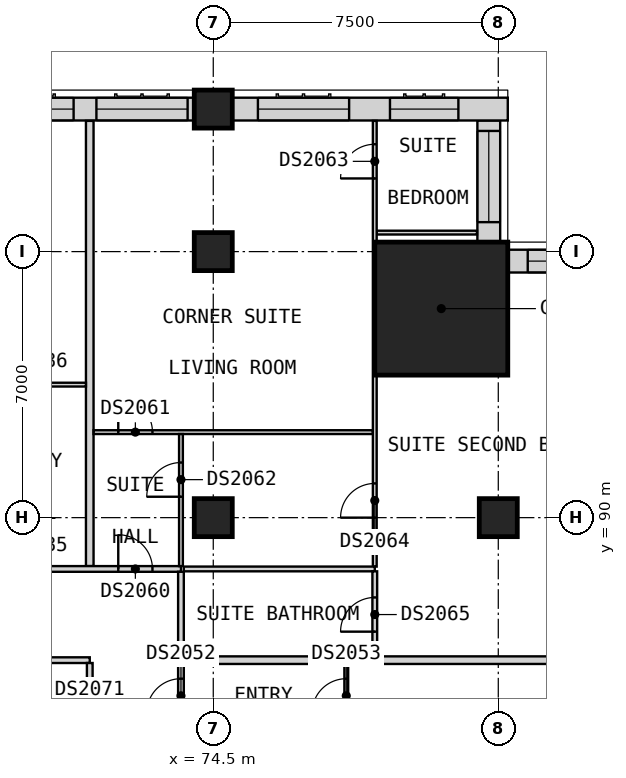
"""IFC4 building model, lengths in metres.
Left out: names, types, materials, properties, quantities, classifications, styles, units other than length and angle.
Written with IfcOpenShell. Run it as: python <this file> out.ifc"""

import sys

from ifc_helpers import new_model, si_unit, direction, frame, frame_2d, origin, origin_2d, place, context, subcontext, project, spatial, rectangle, extrude, element, fill, save


model = new_model("IFC4")
c1 = context("Model", 3, precision=1e-05, world=origin(), true_north=direction((0.0, 1.0)))
c2 = subcontext(c1, "Body", "Model", "MODEL_VIEW")
j1 = project(units=[si_unit("LENGTHUNIT", "METRE"), si_unit("PLANEANGLEUNIT", "RADIAN")], contexts=[c1])
p1 = place(None, origin())
s1 = spatial("IfcSite", under=j1, at=p1, CompositionType="ELEMENT")
p2 = place(p1, origin())
s2 = spatial("IfcBuilding", under=s1, at=p2, CompositionType="ELEMENT")
p3 = place(p2, frame((0.0, 0.0, 162.6)))
s3 = spatial("IfcBuildingStorey", under=s2, at=p3, CompositionType="ELEMENT", Elevation=162.6)
for number, where, z_axis, x_axis in (
    (1, (74.5, 100.75, 0.0), (0.0, 0.0, 1.0), (1.0, 0.0, 0.0)),
    (2, (74.5, 90.0, 0.0), (0.0, 0.0, 1.0), (1.0, 0.0, 0.0)),
    (3, (74.5, 97.0, 0.0), (0.0, 0.0, 1.0), (1.0, 0.0, 0.0)),
    (4, (82.0, 90.0, 0.0), (0.0, 0.0, 1.0), (1.0, 0.0, 0.0)),
):
    element("IfcColumn", number, at=place(p3, frame(where, z_axis=z_axis, x_axis=x_axis)), inside=s3, PredefinedType="COLUMN", context=c2, shape_type="SweptSolid", body=[
        extrude(rectangle(XDim=1.0, YDim=1.0, at=origin_2d()), origin(), (0.0, 0.0, 1.0), 3.6),
    ])
p4 = place(p3, frame((80.5, 95.5, 0.0), z_axis=(0.0, 0.0, 1.0), x_axis=(1.0, 0.0, 0.0)))
e5 = element("IfcColumn", 5, at=p4, inside=s3, PredefinedType="COLUMN", context=c2, shape_type="SweptSolid", body=[
    extrude(rectangle(XDim=3.5, YDim=3.5, at=origin_2d()), origin(), (0.0, 0.0, 1.0), 3.6),
])
p5 = place(p3, frame((85.45, 96.75, 0.0), z_axis=(0.0, 0.0, 1.0), x_axis=(-1.0, 0.0, 0.0)))
e6 = element("IfcWall", 6, at=p5, inside=s3, PredefinedType="SOLIDWALL", context=c2, shape_type="SweptSolid", body=[
    extrude(rectangle(XDim=3.2, YDim=0.6, at=frame_2d((1.6, 0.0))), origin(), (0.0, 0.0, 1.0), 3.2),
])
p6 = place(p5, frame((0.275, 0.0, 0.8)))
e7 = element("IfcOpeningElement", 7, at=p6, cuts=e6, PredefinedType="OPENING", context=c2, shape_type="SweptSolid", body=[
    extrude(rectangle(XDim=2.4, YDim=1.8, at=frame_2d((1.2, 0.9))), frame((0.0, 0.31, 0.0), z_axis=(0.0, -1.0, 0.0), x_axis=(1.0, 0.0, 0.0)), (0.0, 0.0, 1.0), 0.62),
])
p7 = place(p3, frame((81.75, 97.25, 0.0), z_axis=(0.0, 0.0, 1.0), x_axis=(0.0, 1.0, 0.0)))
e8 = element("IfcWall", 8, at=p7, inside=s3, PredefinedType="SOLIDWALL", context=c2, shape_type="SweptSolid", body=[
    extrude(rectangle(XDim=3.2, YDim=0.6, at=frame_2d((1.6, 0.0))), origin(), (0.0, 0.0, 1.0), 3.2),
])
p8 = place(p7, frame((0.525, 0.0, 0.8)))
e9 = element("IfcOpeningElement", 9, at=p8, cuts=e8, PredefinedType="OPENING", context=c2, shape_type="SweptSolid", body=[
    extrude(rectangle(XDim=2.4, YDim=1.8, at=frame_2d((1.2, 0.9))), frame((0.0, 0.31, 0.0), z_axis=(0.0, -1.0, 0.0), x_axis=(1.0, 0.0, 0.0)), (0.0, 0.0, 1.0), 0.62),
])
p9 = place(p3, frame((82.25, 100.75, 0.0), z_axis=(0.0, 0.0, 1.0), x_axis=(-1.0, 0.0, 0.0)))
e10 = element("IfcWall", 10, at=p9, inside=s3, PredefinedType="SOLIDWALL", context=c2, shape_type="SweptSolid", body=[
    extrude(rectangle(XDim=7.25, YDim=0.6, at=frame_2d((3.625, 0.0))), origin(), (0.0, 0.0, 1.0), 2.85),
])
p10 = place(p9, frame((4.175, 0.0, 0.8)))
e11 = element("IfcOpeningElement", 11, at=p10, cuts=e10, PredefinedType="OPENING", context=c2, shape_type="SweptSolid", body=[
    extrude(rectangle(XDim=2.4, YDim=1.8, at=frame_2d((1.2, 0.9))), frame((0.0, 0.31, 0.0), z_axis=(0.0, -1.0, 0.0), x_axis=(1.0, 0.0, 0.0)), (0.0, 0.0, 1.0), 0.62),
])
p11 = place(p9, frame((1.3, 0.0, 0.8)))
e12 = element("IfcOpeningElement", 12, at=p11, cuts=e10, PredefinedType="OPENING", context=c2, shape_type="SweptSolid", body=[
    extrude(rectangle(XDim=1.8, YDim=1.8, at=frame_2d((0.9, 0.9))), frame((0.0, 0.31, 0.0), z_axis=(0.0, -1.0, 0.0), x_axis=(1.0, 0.0, 0.0)), (0.0, 0.0, 1.0), 0.62),
])
p12 = place(p3, frame((74.0, 100.75, 0.0), z_axis=(0.0, 0.0, 1.0), x_axis=(-1.0, 0.0, 0.0)))
e13 = element("IfcWall", 13, at=p12, inside=s3, PredefinedType="SOLIDWALL", context=c2, shape_type="SweptSolid", body=[
    extrude(rectangle(XDim=6.0, YDim=0.6, at=frame_2d((3.0, 0.0))), origin(), (0.0, 0.0, 1.0), 2.85),
])
p13 = place(p12, frame((3.175, 0.0, 0.8)))
e14 = element("IfcOpeningElement", 14, at=p13, cuts=e13, PredefinedType="OPENING", context=c2, shape_type="SweptSolid", body=[
    extrude(rectangle(XDim=2.4, YDim=1.8, at=frame_2d((1.2, 0.9))), frame((0.0, 0.31, 0.0), z_axis=(0.0, -1.0, 0.0), x_axis=(1.0, 0.0, 0.0)), (0.0, 0.0, 1.0), 0.62),
])
p14 = place(p12, frame((0.175, 0.0, 0.8)))
e15 = element("IfcOpeningElement", 15, at=p14, cuts=e13, PredefinedType="OPENING", context=c2, shape_type="SweptSolid", body=[
    extrude(rectangle(XDim=2.4, YDim=1.8, at=frame_2d((1.2, 0.9))), frame((0.0, 0.31, 0.0), z_axis=(0.0, -1.0, 0.0), x_axis=(1.0, 0.0, 0.0)), (0.0, 0.0, 1.0), 0.62),
])
for number, where, z_axis, x_axis in (
    (16, (73.725, 86.25, 0.0), (0.0, 0.0, 1.0), (1.0, 0.0, 0.0)),
    (17, (71.25, 88.725, 0.0), (0.0, 0.0, 1.0), (0.0, 1.0, 0.0)),
):
    element("IfcWall", number, at=place(p3, frame(where, z_axis=z_axis, x_axis=x_axis)), inside=s3, PredefinedType="PARTITIONING", context=c2, shape_type="SweptSolid", body=[
        extrude(rectangle(XDim=11.715, YDim=0.2, at=frame_2d((5.857, 0.0))), origin(), (0.0, 0.0, 1.0), 3.2),
    ])
p15 = place(p3, frame((33.75, 86.25, 0.0), z_axis=(0.0, 0.0, 1.0), x_axis=(1.0, 0.0, 0.0)))
e18 = element("IfcWall", 18, at=p15, inside=s3, PredefinedType="PARTITIONING", context=c2, shape_type="SweptSolid", body=[
    extrude(rectangle(XDim=37.5, YDim=0.15, at=frame_2d((18.75, 0.0))), origin(), (0.0, 0.0, 1.0), 3.2),
])
p16 = place(p15, frame((1.8, 0.0, 0.0)))
e19 = element("IfcOpeningElement", 19, at=p16, cuts=e18, PredefinedType="OPENING", context=c2, shape_type="SweptSolid", body=[
    extrude(rectangle(XDim=0.9, YDim=2.1, at=frame_2d((0.45, 1.05))), frame((0.0, 0.085, 0.0), z_axis=(0.0, -1.0, 0.0), x_axis=(1.0, 0.0, 0.0)), (0.0, 0.0, 1.0), 0.17),
])
p17 = place(p3, frame((33.75, 88.65, 0.0), z_axis=(0.0, 0.0, 1.0), x_axis=(1.0, 0.0, 0.0)))
e20 = element("IfcWall", 20, at=p17, inside=s3, PredefinedType="PARTITIONING", context=c2, shape_type="SweptSolid", body=[
    extrude(rectangle(XDim=39.9, YDim=0.15, at=frame_2d((19.95, 0.0))), origin(), (0.0, 0.0, 1.0), 3.2),
])
p18 = place(p17, frame((5.175, 0.0, 0.0)))
e21 = element("IfcOpeningElement", 21, at=p18, cuts=e20, PredefinedType="OPENING", context=c2, shape_type="SweptSolid", body=[
    extrude(rectangle(XDim=0.9, YDim=2.1, at=frame_2d((0.45, 1.05))), frame((0.0, 0.085, 0.0), z_axis=(0.0, -1.0, 0.0), x_axis=(1.0, 0.0, 0.0)), (0.0, 0.0, 1.0), 0.17),
])
p19 = place(p17, frame((9.3, 0.0, 0.0)))
e22 = element("IfcOpeningElement", 22, at=p19, cuts=e20, PredefinedType="OPENING", context=c2, shape_type="SweptSolid", body=[
    extrude(rectangle(XDim=0.9, YDim=2.1, at=frame_2d((0.45, 1.05))), frame((0.0, 0.085, 0.0), z_axis=(0.0, -1.0, 0.0), x_axis=(1.0, 0.0, 0.0)), (0.0, 0.0, 1.0), 0.17),
])
p20 = place(p17, frame((21.113, 0.0, 0.0)))
e23 = element("IfcOpeningElement", 23, at=p20, cuts=e20, PredefinedType="OPENING", context=c2, shape_type="SweptSolid", body=[
    extrude(rectangle(XDim=0.9, YDim=2.1, at=frame_2d((0.45, 1.05))), frame((0.0, 0.085, 0.0), z_axis=(0.0, -1.0, 0.0), x_axis=(1.0, 0.0, 0.0)), (0.0, 0.0, 1.0), 0.17),
])
p21 = place(p17, frame((28.05, 0.0, 0.0)))
e24 = element("IfcOpeningElement", 24, at=p21, cuts=e20, PredefinedType="OPENING", context=c2, shape_type="SweptSolid", body=[
    extrude(rectangle(XDim=0.9, YDim=2.1, at=frame_2d((0.45, 1.05))), frame((0.0, 0.085, 0.0), z_axis=(0.0, -1.0, 0.0), x_axis=(1.0, 0.0, 0.0)), (0.0, 0.0, 1.0), 0.17),
])
p22 = place(p17, frame((35.55, 0.0, 0.0)))
e25 = element("IfcOpeningElement", 25, at=p22, cuts=e20, PredefinedType="OPENING", context=c2, shape_type="SweptSolid", body=[
    extrude(rectangle(XDim=0.9, YDim=2.1, at=frame_2d((0.45, 1.05))), frame((0.0, 0.085, 0.0), z_axis=(0.0, -1.0, 0.0), x_axis=(1.0, 0.0, 0.0)), (0.0, 0.0, 1.0), 0.17),
])
p23 = place(p17, frame((38.25, 0.0, 0.0)))
e26 = element("IfcOpeningElement", 26, at=p23, cuts=e20, PredefinedType="OPENING", context=c2, shape_type="SweptSolid", body=[
    extrude(rectangle(XDim=0.9, YDim=2.1, at=frame_2d((0.45, 1.05))), frame((0.0, 0.085, 0.0), z_axis=(0.0, -1.0, 0.0), x_axis=(1.0, 0.0, 0.0)), (0.0, 0.0, 1.0), 0.17),
])
p24 = place(p3, frame((71.25, 78.075, 0.0), z_axis=(0.0, 0.0, 1.0), x_axis=(0.0, 1.0, 0.0)))
e27 = element("IfcWall", 27, at=p24, inside=s3, PredefinedType="PARTITIONING", context=c2, shape_type="SweptSolid", body=[
    extrude(rectangle(XDim=8.1, YDim=0.15, at=frame_2d((4.05, 0.0))), origin(), (0.0, 0.0, 1.0), 3.2),
])
p25 = place(p24, frame((5.85, 0.0, 0.0)))
e28 = element("IfcOpeningElement", 28, at=p25, cuts=e27, PredefinedType="OPENING", context=c2, shape_type="SweptSolid", body=[
    extrude(rectangle(XDim=0.9, YDim=2.1, at=frame_2d((0.45, 1.05))), frame((0.0, 0.085, 0.0), z_axis=(0.0, -1.0, 0.0), x_axis=(1.0, 0.0, 0.0)), (0.0, 0.0, 1.0), 0.17),
])
p26 = place(p24, frame((1.725, 0.0, 0.0)))
e29 = element("IfcOpeningElement", 29, at=p26, cuts=e27, PredefinedType="OPENING", context=c2, shape_type="SweptSolid", body=[
    extrude(rectangle(XDim=0.9, YDim=2.1, at=frame_2d((0.45, 1.05))), frame((0.0, 0.085, 0.0), z_axis=(0.0, -1.0, 0.0), x_axis=(1.0, 0.0, 0.0)), (0.0, 0.0, 1.0), 0.17),
])
p27 = place(p3, frame((73.65, 50.175, 0.0), z_axis=(0.0, 0.0, 1.0), x_axis=(0.0, 1.0, 0.0)))
e30 = element("IfcWall", 30, at=p27, inside=s3, PredefinedType="PARTITIONING", context=c2, shape_type="SweptSolid", body=[
    extrude(rectangle(XDim=38.4, YDim=0.15, at=frame_2d((19.2, 0.0))), origin(), (0.0, 0.0, 1.0), 3.2),
])
p28 = place(p27, frame((7.875, 0.0, 0.0)))
e31 = element("IfcOpeningElement", 31, at=p28, cuts=e30, PredefinedType="OPENING", context=c2, shape_type="SweptSolid", body=[
    extrude(rectangle(XDim=0.9, YDim=2.1, at=frame_2d((0.45, 1.05))), frame((0.0, 0.085, 0.0), z_axis=(0.0, -1.0, 0.0), x_axis=(1.0, 0.0, 0.0)), (0.0, 0.0, 1.0), 0.17),
])
p29 = place(p27, frame((12.188, 0.0, 0.0)))
e32 = element("IfcOpeningElement", 32, at=p29, cuts=e30, PredefinedType="OPENING", context=c2, shape_type="SweptSolid", body=[
    extrude(rectangle(XDim=0.9, YDim=2.1, at=frame_2d((0.45, 1.05))), frame((0.0, 0.085, 0.0), z_axis=(0.0, -1.0, 0.0), x_axis=(1.0, 0.0, 0.0)), (0.0, 0.0, 1.0), 0.17),
])
p30 = place(p27, frame((15.375, 0.0, 0.0)))
e33 = element("IfcOpeningElement", 33, at=p30, cuts=e30, PredefinedType="OPENING", context=c2, shape_type="SweptSolid", body=[
    extrude(rectangle(XDim=0.9, YDim=2.1, at=frame_2d((0.45, 1.05))), frame((0.0, 0.085, 0.0), z_axis=(0.0, -1.0, 0.0), x_axis=(1.0, 0.0, 0.0)), (0.0, 0.0, 1.0), 0.17),
])
p31 = place(p27, frame((30.375, 0.0, 0.0)))
e34 = element("IfcOpeningElement", 34, at=p31, cuts=e30, PredefinedType="OPENING", context=c2, shape_type="SweptSolid", body=[
    extrude(rectangle(XDim=0.9, YDim=2.1, at=frame_2d((0.45, 1.05))), frame((0.0, 0.085, 0.0), z_axis=(0.0, -1.0, 0.0), x_axis=(1.0, 0.0, 0.0)), (0.0, 0.0, 1.0), 0.17),
])
p32 = place(p27, frame((34.688, 0.0, 0.0)))
e35 = element("IfcOpeningElement", 35, at=p32, cuts=e30, PredefinedType="OPENING", context=c2, shape_type="SweptSolid", body=[
    extrude(rectangle(XDim=0.9, YDim=2.1, at=frame_2d((0.45, 1.05))), frame((0.0, 0.085, 0.0), z_axis=(0.0, -1.0, 0.0), x_axis=(1.0, 0.0, 0.0)), (0.0, 0.0, 1.0), 0.17),
])
p33 = place(p3, frame((71.35, 92.25, 0.0), z_axis=(0.0, 0.0, 1.0), x_axis=(1.0, 0.0, 0.0)))
e36 = element("IfcWall", 36, at=p33, inside=s3, PredefinedType="PARTITIONING", context=c2, shape_type="SweptSolid", body=[
    extrude(rectangle(XDim=7.35, YDim=0.1, at=frame_2d((3.675, 0.0))), origin(), (0.0, 0.0, 1.0), 3.2),
])
p34 = place(p33, frame((0.65, 0.0, 0.0)))
e37 = element("IfcOpeningElement", 37, at=p34, cuts=e36, PredefinedType="OPENING", context=c2, shape_type="SweptSolid", body=[
    extrude(rectangle(XDim=0.9, YDim=2.1, at=frame_2d((0.45, 1.05))), frame((0.0, 0.06, 0.0), z_axis=(0.0, -1.0, 0.0), x_axis=(1.0, 0.0, 0.0)), (0.0, 0.0, 1.0), 0.12),
])
p35 = place(p3, frame((68.312, 93.5, 0.0), z_axis=(0.0, 0.0, 1.0), x_axis=(1.0, 0.0, 0.0)))
e38 = element("IfcWall", 38, at=p35, inside=s3, PredefinedType="PARTITIONING", context=c2, shape_type="SweptSolid", body=[
    extrude(rectangle(XDim=2.837, YDim=0.1, at=frame_2d((1.419, 0.0))), origin(), (0.0, 0.0, 1.0), 3.2),
])
p36 = place(p35, frame((0.988, 0.0, 0.0)))
e39 = element("IfcOpeningElement", 39, at=p36, cuts=e38, PredefinedType="OPENING", context=c2, shape_type="SweptSolid", body=[
    extrude(rectangle(XDim=0.9, YDim=2.1, at=frame_2d((0.45, 1.05))), frame((0.0, 0.06, 0.0), z_axis=(0.0, -1.0, 0.0), x_axis=(1.0, 0.0, 0.0)), (0.0, 0.0, 1.0), 0.12),
])
p37 = place(p3, frame((78.8, 97.5, 0.0), z_axis=(0.0, 0.0, 1.0), x_axis=(1.0, 0.0, 0.0)))
e40 = element("IfcWall", 40, at=p37, inside=s3, PredefinedType="PARTITIONING", context=c2, shape_type="SweptSolid", body=[
    extrude(rectangle(XDim=2.64, YDim=0.1, at=frame_2d((1.32, 0.0))), origin(), (0.0, 0.0, 1.0), 3.2),
])
p38 = place(p3, frame((73.65, 88.725, 0.0), z_axis=(0.0, 0.0, 1.0), x_axis=(0.0, 1.0, 0.0)))
e41 = element("IfcWall", 41, at=p38, inside=s3, PredefinedType="PARTITIONING", context=c2, shape_type="SweptSolid", body=[
    extrude(rectangle(XDim=3.475, YDim=0.1, at=frame_2d((1.737, 0.0))), origin(), (0.0, 0.0, 1.0), 3.2),
])
p39 = place(p38, frame((1.825, 0.0, 0.0)))
e42 = element("IfcOpeningElement", 42, at=p39, cuts=e41, PredefinedType="OPENING", context=c2, shape_type="SweptSolid", body=[
    extrude(rectangle(XDim=0.9, YDim=2.1, at=frame_2d((0.45, 1.05))), frame((0.0, 0.06, 0.0), z_axis=(0.0, -1.0, 0.0), x_axis=(1.0, 0.0, 0.0)), (0.0, 0.0, 1.0), 0.12),
])
p40 = place(p3, frame((78.0, 84.438, 0.0), z_axis=(0.0, 0.0, 1.0), x_axis=(0.0, 1.0, 0.0)))
e43 = element("IfcWall", 43, at=p40, inside=s3, PredefinedType="PARTITIONING", context=c2, shape_type="SweptSolid", body=[
    extrude(rectangle(XDim=1.712, YDim=0.1, at=frame_2d((0.856, 0.0))), origin(), (0.0, 0.0, 1.0), 3.2),
])
p41 = place(p40, frame((0.425, 0.0, 0.0)))
e44 = element("IfcOpeningElement", 44, at=p41, cuts=e43, PredefinedType="OPENING", context=c2, shape_type="SweptSolid", body=[
    extrude(rectangle(XDim=0.9, YDim=2.1, at=frame_2d((0.45, 1.05))), frame((0.0, 0.06, 0.0), z_axis=(0.0, -1.0, 0.0), x_axis=(1.0, 0.0, 0.0)), (0.0, 0.0, 1.0), 0.12),
])
p42 = place(p3, frame((78.75, 88.712, 0.0), z_axis=(0.0, 0.0, 1.0), x_axis=(0.0, 1.0, 0.0)))
e45 = element("IfcWall", 45, at=p42, inside=s3, PredefinedType="PARTITIONING", context=c2, shape_type="SweptSolid", body=[
    extrude(rectangle(XDim=11.728, YDim=0.1, at=frame_2d((5.864, 0.0))), origin(), (0.0, 0.0, 1.0), 3.2),
])
p43 = place(p42, frame((10.212, 0.0, 0.0)))
e46 = element("IfcOpeningElement", 46, at=p43, cuts=e45, PredefinedType="OPENING", context=c2, shape_type="SweptSolid", body=[
    extrude(rectangle(XDim=0.9, YDim=2.1, at=frame_2d((0.45, 1.05))), frame((0.0, 0.06, 0.0), z_axis=(0.0, -1.0, 0.0), x_axis=(1.0, 0.0, 0.0)), (0.0, 0.0, 1.0), 0.12),
])
p44 = place(p42, frame((1.288, 0.0, 0.0)))
e47 = element("IfcOpeningElement", 47, at=p44, cuts=e45, PredefinedType="OPENING", context=c2, shape_type="SweptSolid", body=[
    extrude(rectangle(XDim=0.9, YDim=2.1, at=frame_2d((0.45, 1.05))), frame((0.0, 0.06, 0.0), z_axis=(0.0, -1.0, 0.0), x_axis=(1.0, 0.0, 0.0)), (0.0, 0.0, 1.0), 0.12),
])
p45 = place(p3, frame((73.725, 88.65, 0.0), z_axis=(0.0, 0.0, 1.0), x_axis=(1.0, 0.0, 0.0)))
e48 = element("IfcWall", 48, at=p45, inside=s3, PredefinedType="PARTITIONING", context=c2, shape_type="SweptSolid", body=[
    extrude(rectangle(XDim=5.025, YDim=0.125, at=frame_2d((2.512, 0.0))), origin(), (0.0, 0.0, 1.0), 3.2),
])
p46 = place(p3, frame((78.75, 86.35, 0.0), z_axis=(0.0, 0.0, 1.0), x_axis=(0.0, 1.0, 0.0)))
e49 = element("IfcWall", 49, at=p46, inside=s3, PredefinedType="PARTITIONING", context=c2, shape_type="SweptSolid", body=[
    extrude(rectangle(XDim=2.237, YDim=0.125, at=frame_2d((1.119, 0.0))), origin(), (0.0, 0.0, 1.0), 3.2),
])
p47 = place(p46, frame((0.65, 0.0, 0.0)))
e50 = element("IfcOpeningElement", 50, at=p47, cuts=e49, PredefinedType="OPENING", context=c2, shape_type="SweptSolid", body=[
    extrude(rectangle(XDim=0.9, YDim=2.1, at=frame_2d((0.45, 1.05))), frame((0.0, 0.073, 0.0), z_axis=(0.0, -1.0, 0.0), x_axis=(1.0, 0.0, 0.0)), (0.0, 0.0, 1.0), 0.145),
])
p48 = place(p6, origin())
e51 = element("IfcWindow", 51, at=p48, inside=s3, PartitioningType="SINGLE_PANEL", PredefinedType="WINDOW", context=c2, shape_type="SweptSolid", body=[
    extrude(rectangle(XDim=2.4, YDim=1.8, at=frame_2d((1.2, 0.9))), frame((0.0, -0.07, 0.0), z_axis=(0.0, -1.0, 0.0), x_axis=(1.0, 0.0, 0.0)), (0.0, 0.0, 1.0), 0.06),
])
fill(e7, e51)
p49 = place(p8, origin())
e52 = element("IfcWindow", 52, at=p49, inside=s3, PartitioningType="SINGLE_PANEL", PredefinedType="WINDOW", context=c2, shape_type="SweptSolid", body=[
    extrude(rectangle(XDim=2.4, YDim=1.8, at=frame_2d((1.2, 0.9))), frame((0.0, -0.07, 0.0), z_axis=(0.0, -1.0, 0.0), x_axis=(1.0, 0.0, 0.0)), (0.0, 0.0, 1.0), 0.06),
])
fill(e9, e52)
p50 = place(p10, origin())
e53 = element("IfcWindow", 53, at=p50, inside=s3, PartitioningType="SINGLE_PANEL", PredefinedType="WINDOW", context=c2, shape_type="SweptSolid", body=[
    extrude(rectangle(XDim=2.4, YDim=1.8, at=frame_2d((1.2, 0.9))), frame((0.0, -0.07, 0.0), z_axis=(0.0, -1.0, 0.0), x_axis=(1.0, 0.0, 0.0)), (0.0, 0.0, 1.0), 0.06),
])
fill(e11, e53)
p51 = place(p11, origin())
e54 = element("IfcWindow", 54, at=p51, inside=s3, PartitioningType="SINGLE_PANEL", PredefinedType="WINDOW", context=c2, shape_type="SweptSolid", body=[
    extrude(rectangle(XDim=1.8, YDim=1.8, at=frame_2d((0.9, 0.9))), frame((0.0, -0.07, 0.0), z_axis=(0.0, -1.0, 0.0), x_axis=(1.0, 0.0, 0.0)), (0.0, 0.0, 1.0), 0.06),
])
fill(e12, e54)
p52 = place(p13, origin())
e55 = element("IfcWindow", 55, at=p52, inside=s3, PartitioningType="SINGLE_PANEL", PredefinedType="WINDOW", context=c2, shape_type="SweptSolid", body=[
    extrude(rectangle(XDim=2.4, YDim=1.8, at=frame_2d((1.2, 0.9))), frame((0.0, -0.07, 0.0), z_axis=(0.0, -1.0, 0.0), x_axis=(1.0, 0.0, 0.0)), (0.0, 0.0, 1.0), 0.06),
])
fill(e14, e55)
p53 = place(p14, origin())
e56 = element("IfcWindow", 56, at=p53, inside=s3, PartitioningType="SINGLE_PANEL", PredefinedType="WINDOW", context=c2, shape_type="SweptSolid", body=[
    extrude(rectangle(XDim=2.4, YDim=1.8, at=frame_2d((1.2, 0.9))), frame((0.0, -0.07, 0.0), z_axis=(0.0, -1.0, 0.0), x_axis=(1.0, 0.0, 0.0)), (0.0, 0.0, 1.0), 0.06),
])
fill(e15, e56)
p54 = place(p32, origin())
e57 = element("IfcDoor", 57, at=p54, inside=s3, OperationType="SINGLE_SWING_RIGHT", PredefinedType="DOOR", context=c2, shape_type="SweptSolid", body=[
    extrude(rectangle(XDim=0.9, YDim=2.1, at=frame_2d((0.45, 1.05))), frame((0.0, 0.025, 0.0), z_axis=(0.0, -1.0, 0.0), x_axis=(1.0, 0.0, 0.0)), (0.0, 0.0, 1.0), 0.05),
])
fill(e35, e57)
p55 = place(p41, origin())
e58 = element("IfcDoor", 58, at=p55, inside=s3, OperationType="SINGLE_SWING_LEFT", PredefinedType="DOOR", context=c2, shape_type="SweptSolid", body=[
    extrude(rectangle(XDim=0.9, YDim=2.1, at=frame_2d((0.45, 1.05))), frame((0.0, 0.025, 0.0), z_axis=(0.0, -1.0, 0.0), x_axis=(1.0, 0.0, 0.0)), (0.0, 0.0, 1.0), 0.05),
])
fill(e44, e58)
p56 = place(p23, origin())
e59 = element("IfcDoor", 59, at=p56, inside=s3, OperationType="SINGLE_SWING_RIGHT", PredefinedType="DOOR", context=c2, shape_type="SweptSolid", body=[
    extrude(rectangle(XDim=0.9, YDim=2.1, at=frame_2d((0.45, 1.05))), frame((0.0, 0.025, 0.0), z_axis=(0.0, -1.0, 0.0), x_axis=(1.0, 0.0, 0.0)), (0.0, 0.0, 1.0), 0.05),
])
fill(e26, e59)
p57 = place(p34, origin())
e60 = element("IfcDoor", 60, at=p57, inside=s3, OperationType="SINGLE_SWING_LEFT", PredefinedType="DOOR", context=c2, shape_type="SweptSolid", body=[
    extrude(rectangle(XDim=0.9, YDim=2.1, at=frame_2d((0.45, 1.05))), frame((0.0, 0.025, 0.0), z_axis=(0.0, -1.0, 0.0), x_axis=(1.0, 0.0, 0.0)), (0.0, 0.0, 1.0), 0.05),
])
fill(e37, e60)
p58 = place(p39, origin())
e61 = element("IfcDoor", 61, at=p58, inside=s3, OperationType="SINGLE_SWING_RIGHT", PredefinedType="DOOR", context=c2, shape_type="SweptSolid", body=[
    extrude(rectangle(XDim=0.9, YDim=2.1, at=frame_2d((0.45, 1.05))), frame((0.0, 0.025, 0.0), z_axis=(0.0, -1.0, 0.0), x_axis=(1.0, 0.0, 0.0)), (0.0, 0.0, 1.0), 0.05),
])
fill(e42, e61)
p59 = place(p43, origin())
e62 = element("IfcDoor", 62, at=p59, inside=s3, OperationType="SINGLE_SWING_LEFT", PredefinedType="DOOR", context=c2, shape_type="SweptSolid", body=[
    extrude(rectangle(XDim=0.9, YDim=2.1, at=frame_2d((0.45, 1.05))), frame((0.0, 0.025, 0.0), z_axis=(0.0, -1.0, 0.0), x_axis=(1.0, 0.0, 0.0)), (0.0, 0.0, 1.0), 0.05),
])
fill(e46, e62)
p60 = place(p44, origin())
e63 = element("IfcDoor", 63, at=p60, inside=s3, OperationType="SINGLE_SWING_RIGHT", PredefinedType="DOOR", context=c2, shape_type="SweptSolid", body=[
    extrude(rectangle(XDim=0.9, YDim=2.1, at=frame_2d((0.45, 1.05))), frame((0.0, 0.025, 0.0), z_axis=(0.0, -1.0, 0.0), x_axis=(1.0, 0.0, 0.0)), (0.0, 0.0, 1.0), 0.05),
])
fill(e47, e63)
p61 = place(p47, origin())
e64 = element("IfcDoor", 64, at=p61, inside=s3, OperationType="SINGLE_SWING_LEFT", PredefinedType="DOOR", context=c2, shape_type="SweptSolid", body=[
    extrude(rectangle(XDim=0.9, YDim=2.1, at=frame_2d((0.45, 1.05))), frame((0.0, 0.025, 0.0), z_axis=(0.0, -1.0, 0.0), x_axis=(1.0, 0.0, 0.0)), (0.0, 0.0, 1.0), 0.05),
])
fill(e50, e64)
save(model, sys.argv[1])
